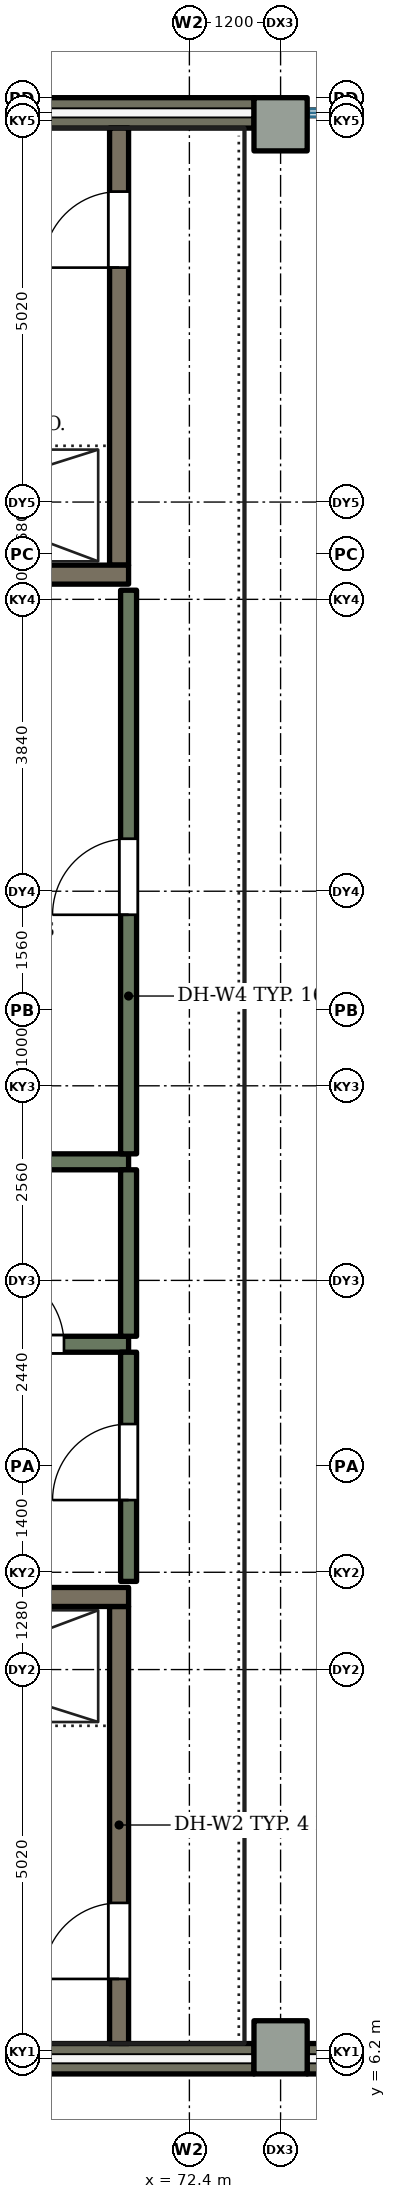
"""IFC4 building model, lengths in metres.
Left out: names, types, materials, properties, quantities, classifications, styles, units other than length and angle.
Written with IfcOpenShell. Run it as: python <this file> out.ifc"""

import sys

from ifc_helpers import new_model, si_unit, direction, frame, frame_2d, origin, origin_2d, place, context, subcontext, project, spatial, rectangle, extrude, element, fill, save


model = new_model("IFC4")
c1 = context("Model", 3, precision=1e-05, world=origin(), true_north=direction((0.0, 1.0)))
c2 = subcontext(c1, "Body", "Model", "MODEL_VIEW")
j1 = project(units=[si_unit("LENGTHUNIT", "METRE"), si_unit("PLANEANGLEUNIT", "RADIAN")], contexts=[c1])
p1 = place(None, origin())
s1 = spatial("IfcSite", under=j1, at=p1, CompositionType="ELEMENT")
p2 = place(p1, origin())
s2 = spatial("IfcBuilding", under=s1, at=p2, CompositionType="ELEMENT")
p3 = place(p2, frame((0.0, 0.0, 4.2)))
s3 = spatial("IfcBuildingStorey", under=s2, at=p3, CompositionType="ELEMENT", Elevation=4.2)
for number, where, z_axis, x_axis in (
    (1, (73.6, 6.35, 0.0), (0.0, 0.0, 1.0), (1.0, 0.0, 0.0)),
    (2, (73.6, 31.65, 0.0), (0.0, 0.0, 1.0), (1.0, 0.0, 0.0)),
):
    element("IfcColumn", number, at=place(p3, frame(where, z_axis=z_axis, x_axis=x_axis)), inside=s3, PredefinedType="COLUMN", context=c2, shape_type="SweptSolid", body=[
        extrude(rectangle(XDim=0.7, YDim=0.7, at=origin_2d()), origin(), (0.0, 0.0, 1.0), 3.3),
    ])
p4 = place(p3, frame((73.25, 6.2, 0.0), z_axis=(0.0, 0.0, 1.0), x_axis=(-1.0, 0.0, 0.0)))
e3 = element("IfcWall", 3, at=p4, inside=s3, PredefinedType="SOLIDWALL", context=c2, shape_type="SweptSolid", body=[
    extrude(rectangle(XDim=3.0, YDim=0.4, at=frame_2d((1.5, 0.0))), origin(), (0.0, 0.0, 1.0), 3.3),
])
p5 = place(p3, frame((76.95, 6.2, 0.0), z_axis=(0.0, 0.0, 1.0), x_axis=(-1.0, 0.0, 0.0)))
e4 = element("IfcWall", 4, at=p5, inside=s3, PredefinedType="SOLIDWALL", context=c2, shape_type="SweptSolid", body=[
    extrude(rectangle(XDim=3.0, YDim=0.4, at=frame_2d((1.5, 0.0))), origin(), (0.0, 0.0, 1.0), 3.3),
])
p6 = place(p5, frame((0.4, 0.0, 0.6)))
e5 = element("IfcOpeningElement", 5, at=p6, cuts=e4, PredefinedType="OPENING", context=c2, shape_type="SweptSolid", body=[
    extrude(rectangle(XDim=2.2, YDim=2.4, at=frame_2d((1.1, 1.2))), frame((0.0, 0.21, 0.0), z_axis=(0.0, -1.0, 0.0), x_axis=(1.0, 0.0, 0.0)), (0.0, 0.0, 1.0), 0.42),
])
p7 = place(p3, frame((70.25, 31.8, 0.0), z_axis=(0.0, 0.0, 1.0), x_axis=(1.0, 0.0, 0.0)))
e6 = element("IfcWall", 6, at=p7, inside=s3, PredefinedType="SOLIDWALL", context=c2, shape_type="SweptSolid", body=[
    extrude(rectangle(XDim=3.0, YDim=0.4, at=frame_2d((1.5, 0.0))), origin(), (0.0, 0.0, 1.0), 3.3),
])
p8 = place(p3, frame((71.475, 6.4, 0.0), z_axis=(0.0, 0.0, 1.0), x_axis=(0.0, 1.0, 0.0)))
e7 = element("IfcWall", 7, at=p8, inside=s3, PredefinedType="SHEAR", context=c2, shape_type="SweptSolid", body=[
    extrude(rectangle(XDim=5.75, YDim=0.25, at=frame_2d((2.875, 0.0))), origin(), (0.0, 0.0, 1.0), 3.1),
])
p9 = place(p8, frame((0.85, 0.0, 0.0)))
e8 = element("IfcOpeningElement", 8, at=p9, cuts=e7, PredefinedType="OPENING", context=c2, shape_type="SweptSolid", body=[
    extrude(rectangle(XDim=1.0, YDim=2.1, at=frame_2d((0.5, 1.05))), frame((0.0, 0.135, 0.0), z_axis=(0.0, -1.0, 0.0), x_axis=(1.0, 0.0, 0.0)), (0.0, 0.0, 1.0), 0.27),
])
p10 = place(p3, frame((66.4, 12.275, 0.0), z_axis=(0.0, 0.0, 1.0), x_axis=(1.0, 0.0, 0.0)))
e9 = element("IfcWall", 9, at=p10, inside=s3, PredefinedType="SHEAR", context=c2, shape_type="SweptSolid", body=[
    extrude(rectangle(XDim=5.2, YDim=0.25, at=frame_2d((2.6, 0.0))), origin(), (0.0, 0.0, 1.0), 3.1),
])
p11 = place(p3, frame((71.475, 25.85, 0.0), z_axis=(0.0, 0.0, 1.0), x_axis=(0.0, 1.0, 0.0)))
e10 = element("IfcWall", 10, at=p11, inside=s3, PredefinedType="SHEAR", context=c2, shape_type="SweptSolid", body=[
    extrude(rectangle(XDim=5.75, YDim=0.25, at=frame_2d((2.875, 0.0))), origin(), (0.0, 0.0, 1.0), 3.1),
])
p12 = place(p11, frame((3.914, 0.0, 0.0)))
e11 = element("IfcOpeningElement", 11, at=p12, cuts=e10, PredefinedType="OPENING", context=c2, shape_type="SweptSolid", body=[
    extrude(rectangle(XDim=1.0, YDim=2.1, at=frame_2d((0.5, 1.05))), frame((0.0, 0.135, 0.0), z_axis=(0.0, -1.0, 0.0), x_axis=(1.0, 0.0, 0.0)), (0.0, 0.0, 1.0), 0.27),
])
p13 = place(p3, frame((66.4, 25.725, 0.0), z_axis=(0.0, 0.0, 1.0), x_axis=(1.0, 0.0, 0.0)))
e12 = element("IfcWall", 12, at=p13, inside=s3, PredefinedType="SHEAR", context=c2, shape_type="SweptSolid", body=[
    extrude(rectangle(XDim=5.2, YDim=0.25, at=frame_2d((2.6, 0.0))), origin(), (0.0, 0.0, 1.0), 3.1),
])
p14 = place(p3, frame((69.105, 15.6, 0.0), z_axis=(0.0, 0.0, 1.0), x_axis=(1.0, 0.0, 0.0)))
e13 = element("IfcWall", 13, at=p14, inside=s3, PredefinedType="PARTITIONING", context=c2, shape_type="SweptSolid", body=[
    extrude(rectangle(XDim=2.495, YDim=0.21, at=frame_2d((1.248, 0.0))), origin(), (0.0, 0.0, 1.0), 3.1),
])
p15 = place(p14, frame((0.645, 0.0, 0.0)))
e14 = element("IfcOpeningElement", 14, at=p15, cuts=e13, PredefinedType="OPENING", context=c2, shape_type="SweptSolid", body=[
    extrude(rectangle(XDim=1.0, YDim=2.1, at=frame_2d((0.5, 1.05))), frame((0.0, 0.115, 0.0), z_axis=(0.0, -1.0, 0.0), x_axis=(1.0, 0.0, 0.0)), (0.0, 0.0, 1.0), 0.23),
])
p16 = place(p3, frame((69.105, 18.0, 0.0), z_axis=(0.0, 0.0, 1.0), x_axis=(1.0, 0.0, 0.0)))
e15 = element("IfcWall", 15, at=p16, inside=s3, PredefinedType="PARTITIONING", context=c2, shape_type="SweptSolid", body=[
    extrude(rectangle(XDim=2.495, YDim=0.21, at=frame_2d((1.248, 0.0))), origin(), (0.0, 0.0, 1.0), 3.1),
])
p17 = place(p3, frame((71.6, 12.48, 0.0), z_axis=(0.0, 0.0, 1.0), x_axis=(0.0, 1.0, 0.0)))
e16 = element("IfcWall", 16, at=p17, inside=s3, PredefinedType="PARTITIONING", context=c2, shape_type="SweptSolid", body=[
    extrude(rectangle(XDim=3.015, YDim=0.21, at=frame_2d((1.508, 0.0))), origin(), (0.0, 0.0, 1.0), 3.1),
])
p18 = place(p17, frame((1.07, 0.0, 0.0)))
e17 = element("IfcOpeningElement", 17, at=p18, cuts=e16, PredefinedType="OPENING", context=c2, shape_type="SweptSolid", body=[
    extrude(rectangle(XDim=1.0, YDim=2.1, at=frame_2d((0.5, 1.05))), frame((0.0, 0.115, 0.0), z_axis=(0.0, -1.0, 0.0), x_axis=(1.0, 0.0, 0.0)), (0.0, 0.0, 1.0), 0.23),
])
p19 = place(p3, frame((71.6, 15.705, 0.0), z_axis=(0.0, 0.0, 1.0), x_axis=(0.0, 1.0, 0.0)))
e18 = element("IfcWall", 18, at=p19, inside=s3, PredefinedType="PARTITIONING", context=c2, shape_type="SweptSolid", body=[
    extrude(rectangle(XDim=2.19, YDim=0.21, at=frame_2d((1.095, 0.0))), origin(), (0.0, 0.0, 1.0), 3.1),
])
p20 = place(p3, frame((71.6, 18.105, 0.0), z_axis=(0.0, 0.0, 1.0), x_axis=(0.0, 1.0, 0.0)))
e19 = element("IfcWall", 19, at=p20, inside=s3, PredefinedType="PARTITIONING", context=c2, shape_type="SweptSolid", body=[
    extrude(rectangle(XDim=7.415, YDim=0.21, at=frame_2d((3.708, 0.0))), origin(), (0.0, 0.0, 1.0), 3.1),
])
p21 = place(p20, frame((3.145, 0.0, 0.0)))
e20 = element("IfcOpeningElement", 20, at=p21, cuts=e19, PredefinedType="OPENING", context=c2, shape_type="SweptSolid", body=[
    extrude(rectangle(XDim=1.0, YDim=2.1, at=frame_2d((0.5, 1.05))), frame((0.0, 0.115, 0.0), z_axis=(0.0, -1.0, 0.0), x_axis=(1.0, 0.0, 0.0)), (0.0, 0.0, 1.0), 0.23),
])
p22 = place(p9, origin())
e21 = element("IfcDoor", 21, at=p22, inside=s3, OperationType="SINGLE_SWING_LEFT", PredefinedType="DOOR", context=c2, shape_type="SweptSolid", body=[
    extrude(rectangle(XDim=1.0, YDim=2.1, at=frame_2d((0.5, 1.05))), frame((0.0, 0.025, 0.0), z_axis=(0.0, -1.0, 0.0), x_axis=(1.0, 0.0, 0.0)), (0.0, 0.0, 1.0), 0.05),
])
fill(e8, e21)
p23 = place(p21, origin())
e22 = element("IfcDoor", 22, at=p23, inside=s3, OperationType="SINGLE_SWING_LEFT", PredefinedType="DOOR", context=c2, shape_type="SweptSolid", body=[
    extrude(rectangle(XDim=1.0, YDim=2.1, at=frame_2d((0.5, 1.05))), frame((0.0, 0.025, 0.0), z_axis=(0.0, -1.0, 0.0), x_axis=(1.0, 0.0, 0.0)), (0.0, 0.0, 1.0), 0.05),
])
fill(e20, e22)
p24 = place(p15, origin())
e23 = element("IfcDoor", 23, at=p24, inside=s3, OperationType="SINGLE_SWING_LEFT", PredefinedType="DOOR", context=c2, shape_type="SweptSolid", body=[
    extrude(rectangle(XDim=1.0, YDim=2.1, at=frame_2d((0.5, 1.05))), frame((0.0, 0.025, 0.0), z_axis=(0.0, -1.0, 0.0), x_axis=(1.0, 0.0, 0.0)), (0.0, 0.0, 1.0), 0.05),
])
fill(e14, e23)
p25 = place(p12, origin())
e24 = element("IfcDoor", 24, at=p25, inside=s3, OperationType="SINGLE_SWING_LEFT", PredefinedType="DOOR", context=c2, shape_type="SweptSolid", body=[
    extrude(rectangle(XDim=1.0, YDim=2.1, at=frame_2d((0.5, 1.05))), frame((0.0, 0.025, 0.0), z_axis=(0.0, -1.0, 0.0), x_axis=(1.0, 0.0, 0.0)), (0.0, 0.0, 1.0), 0.05),
])
fill(e11, e24)
p26 = place(p18, origin())
e25 = element("IfcDoor", 25, at=p26, inside=s3, OperationType="SINGLE_SWING_LEFT", PredefinedType="DOOR", context=c2, shape_type="SweptSolid", body=[
    extrude(rectangle(XDim=1.0, YDim=2.1, at=frame_2d((0.5, 1.05))), frame((0.0, 0.025, 0.0), z_axis=(0.0, -1.0, 0.0), x_axis=(1.0, 0.0, 0.0)), (0.0, 0.0, 1.0), 0.05),
])
fill(e17, e25)
save(model, sys.argv[1])
